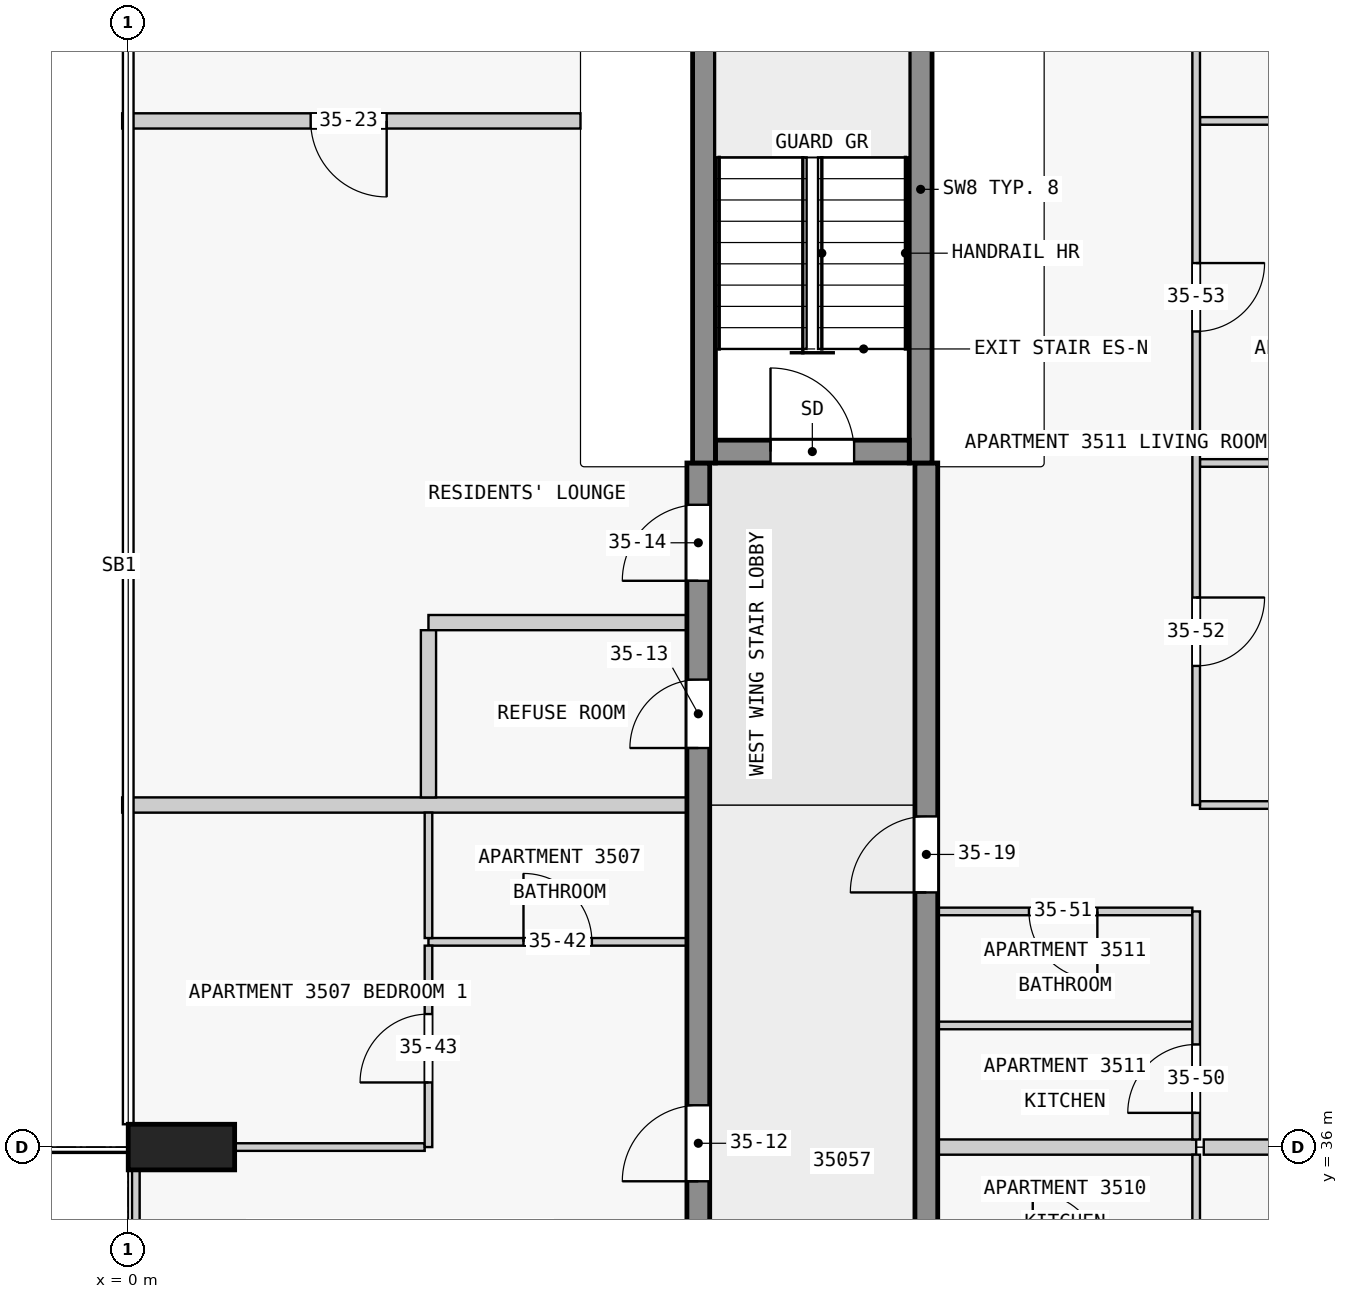
"""IFC4 building model, lengths in metres.
Left out: names, types, materials, properties, quantities, classifications, styles, units other than length and angle.
Written with IfcOpenShell. Run it as: python <this file> out.ifc"""

import sys

from ifc_helpers import new_model, si_unit, direction, frame, frame_2d, origin, origin_2d, place, context, subcontext, project, spatial, rectangle, extrude, element, fill, save


model = new_model("IFC4")
c1 = context("Model", 3, precision=1e-05, world=origin(), true_north=direction((0.0, 1.0)))
c2 = subcontext(c1, "Body", "Model", "MODEL_VIEW")
j1 = project(units=[si_unit("LENGTHUNIT", "METRE"), si_unit("PLANEANGLEUNIT", "RADIAN")], contexts=[c1])
p1 = place(None, origin())
s1 = spatial("IfcSite", under=j1, at=p1, CompositionType="ELEMENT")
p2 = place(p1, origin())
s2 = spatial("IfcBuilding", under=s1, at=p2, CompositionType="ELEMENT")
p3 = place(p2, frame((0.0, 0.0, 139.4)))
s3 = spatial("IfcBuildingStorey", under=s2, at=p3, CompositionType="ELEMENT", Elevation=139.4)
p4 = place(p3, frame((0.7, 36.0, 0.0), z_axis=(0.0, 0.0, 1.0), x_axis=(0.0, 1.0, 0.0)))
e1 = element("IfcColumn", 1, at=p4, inside=s3, PredefinedType="COLUMN", context=c2, shape_type="SweptSolid", body=[
    extrude(rectangle(XDim=0.6, YDim=1.4, at=origin_2d()), origin(), (0.0, 0.0, 1.0), 3.5),
])
p5 = place(p3, frame((7.725, 45.15, 0.0), z_axis=(0.0, 0.0, 1.0), x_axis=(1.0, 0.0, 0.0)))
e2 = element("IfcWall", 2, at=p5, inside=s3, PredefinedType="SHEAR", context=c2, shape_type="SweptSolid", body=[
    extrude(rectangle(XDim=2.55, YDim=0.3, at=frame_2d((1.275, 0.0))), origin(), (0.0, 0.0, 1.0), 3.5),
])
p6 = place(p5, frame((0.725, 0.0, 0.0)))
e3 = element("IfcOpeningElement", 3, at=p6, cuts=e2, PredefinedType="OPENING", context=c2, shape_type="SweptSolid", body=[
    extrude(rectangle(XDim=1.1, YDim=2.1, at=frame_2d((0.55, 1.05))), frame((0.0, 0.16, 0.0), z_axis=(0.0, -1.0, 0.0), x_axis=(1.0, 0.0, 0.0)), (0.0, 0.0, 1.0), 0.32),
])
for number, where, z_axis, x_axis in (
    (4, (7.575, 45.0, 0.0), (0.0, 0.0, 1.0), (0.0, 1.0, 0.0)),
    (5, (10.425, 45.0, 0.0), (0.0, 0.0, 1.0), (0.0, 1.0, 0.0)),
):
    element("IfcWall", number, at=place(p3, frame(where, z_axis=z_axis, x_axis=x_axis)), inside=s3, PredefinedType="SHEAR", context=c2, shape_type="SweptSolid", body=[
        extrude(rectangle(XDim=7.2, YDim=0.3, at=frame_2d((3.6, 0.0))), origin(), (0.0, 0.0, 1.0), 3.5),
    ])
p7 = place(p3, frame((7.5, 18.0, 0.0), z_axis=(0.0, 0.0, 1.0), x_axis=(0.0, 1.0, 0.0)))
e6 = element("IfcWall", 6, at=p7, inside=s3, PredefinedType="SHEAR", context=c2, shape_type="SweptSolid", body=[
    extrude(rectangle(XDim=27.0, YDim=0.3, at=frame_2d((13.5, 0.0))), origin(), (0.0, 0.0, 1.0), 3.25),
])
p8 = place(p7, frame((4.05, 0.0, 0.0)))
e7 = element("IfcOpeningElement", 7, at=p8, cuts=e6, PredefinedType="OPENING", context=c2, shape_type="SweptSolid", body=[
    extrude(rectangle(XDim=1.0, YDim=2.1, at=frame_2d((0.5, 1.05))), frame((0.0, 0.16, 0.0), z_axis=(0.0, -1.0, 0.0), x_axis=(1.0, 0.0, 0.0)), (0.0, 0.0, 1.0), 0.32),
])
p9 = place(p7, frame((10.75, 0.0, 0.0)))
e8 = element("IfcOpeningElement", 8, at=p9, cuts=e6, PredefinedType="OPENING", context=c2, shape_type="SweptSolid", body=[
    extrude(rectangle(XDim=1.0, YDim=2.1, at=frame_2d((0.5, 1.05))), frame((0.0, 0.16, 0.0), z_axis=(0.0, -1.0, 0.0), x_axis=(1.0, 0.0, 0.0)), (0.0, 0.0, 1.0), 0.32),
])
p10 = place(p7, frame((17.55, 0.0, 0.0)))
e9 = element("IfcOpeningElement", 9, at=p10, cuts=e6, PredefinedType="OPENING", context=c2, shape_type="SweptSolid", body=[
    extrude(rectangle(XDim=1.0, YDim=2.1, at=frame_2d((0.5, 1.05))), frame((0.0, 0.16, 0.0), z_axis=(0.0, -1.0, 0.0), x_axis=(1.0, 0.0, 0.0)), (0.0, 0.0, 1.0), 0.32),
])
p11 = place(p7, frame((23.25, 0.0, 0.0)))
e10 = element("IfcOpeningElement", 10, at=p11, cuts=e6, PredefinedType="OPENING", context=c2, shape_type="SweptSolid", body=[
    extrude(rectangle(XDim=0.9, YDim=2.1, at=frame_2d((0.45, 1.05))), frame((0.0, 0.16, 0.0), z_axis=(0.0, -1.0, 0.0), x_axis=(1.0, 0.0, 0.0)), (0.0, 0.0, 1.0), 0.32),
])
p12 = place(p7, frame((25.45, 0.0, 0.0)))
e11 = element("IfcOpeningElement", 11, at=p12, cuts=e6, PredefinedType="OPENING", context=c2, shape_type="SweptSolid", body=[
    extrude(rectangle(XDim=1.0, YDim=2.1, at=frame_2d((0.5, 1.05))), frame((0.0, 0.16, 0.0), z_axis=(0.0, -1.0, 0.0), x_axis=(1.0, 0.0, 0.0)), (0.0, 0.0, 1.0), 0.32),
])
p13 = place(p3, frame((10.5, 18.0, 0.0), z_axis=(0.0, 0.0, 1.0), x_axis=(0.0, 1.0, 0.0)))
e12 = element("IfcWall", 12, at=p13, inside=s3, PredefinedType="SHEAR", context=c2, shape_type="SweptSolid", body=[
    extrude(rectangle(XDim=27.0, YDim=0.3, at=frame_2d((13.5, 0.0))), origin(), (0.0, 0.0, 1.0), 3.25),
])
p14 = place(p13, frame((1.75, 0.0, 0.0)))
e13 = element("IfcOpeningElement", 13, at=p14, cuts=e12, PredefinedType="OPENING", context=c2, shape_type="SweptSolid", body=[
    extrude(rectangle(XDim=1.0, YDim=2.1, at=frame_2d((0.5, 1.05))), frame((0.0, 0.16, 0.0), z_axis=(0.0, -1.0, 0.0), x_axis=(1.0, 0.0, 0.0)), (0.0, 0.0, 1.0), 0.32),
])
p15 = place(p13, frame((6.25, 0.0, 0.0)))
e14 = element("IfcOpeningElement", 14, at=p15, cuts=e12, PredefinedType="OPENING", context=c2, shape_type="SweptSolid", body=[
    extrude(rectangle(XDim=1.0, YDim=2.1, at=frame_2d((0.5, 1.05))), frame((0.0, 0.16, 0.0), z_axis=(0.0, -1.0, 0.0), x_axis=(1.0, 0.0, 0.0)), (0.0, 0.0, 1.0), 0.32),
])
p16 = place(p13, frame((10.35, 0.0, 0.0)))
e15 = element("IfcOpeningElement", 15, at=p16, cuts=e12, PredefinedType="OPENING", context=c2, shape_type="SweptSolid", body=[
    extrude(rectangle(XDim=1.8, YDim=2.1, at=frame_2d((0.9, 1.05))), frame((0.0, 0.16, 0.0), z_axis=(0.0, -1.0, 0.0), x_axis=(1.0, 0.0, 0.0)), (0.0, 0.0, 1.0), 0.32),
])
p17 = place(p13, frame((15.25, 0.0, 0.0)))
e16 = element("IfcOpeningElement", 16, at=p17, cuts=e12, PredefinedType="OPENING", context=c2, shape_type="SweptSolid", body=[
    extrude(rectangle(XDim=1.0, YDim=2.1, at=frame_2d((0.5, 1.05))), frame((0.0, 0.16, 0.0), z_axis=(0.0, -1.0, 0.0), x_axis=(1.0, 0.0, 0.0)), (0.0, 0.0, 1.0), 0.32),
])
p18 = place(p13, frame((21.35, 0.0, 0.0)))
e17 = element("IfcOpeningElement", 17, at=p18, cuts=e12, PredefinedType="OPENING", context=c2, shape_type="SweptSolid", body=[
    extrude(rectangle(XDim=1.0, YDim=2.1, at=frame_2d((0.5, 1.05))), frame((0.0, 0.16, 0.0), z_axis=(0.0, -1.0, 0.0), x_axis=(1.0, 0.0, 0.0)), (0.0, 0.0, 1.0), 0.32),
])
p19 = place(p3, frame((0.1, 31.5, 0.0), z_axis=(0.0, 0.0, 1.0), x_axis=(0.0, 1.0, 0.0)))
e18 = element("IfcWall", 18, at=p19, inside=s3, PredefinedType="STANDARD", context=c2, shape_type="SweptSolid", body=[
    extrude(rectangle(XDim=4.5, YDim=0.1, at=frame_2d((2.25, 0.0))), origin(), (0.0, 0.0, 1.0), 3.25),
])
p20 = place(p19, frame((1.05, 0.0, 0.0)))
e19 = element("IfcOpeningElement", 19, at=p20, cuts=e18, PredefinedType="OPENING", context=c2, shape_type="SweptSolid", body=[
    extrude(rectangle(XDim=2.4, YDim=2.4, at=frame_2d((1.2, 1.2))), frame((0.0, 0.06, 0.0), z_axis=(0.0, -1.0, 0.0), x_axis=(1.0, 0.0, 0.0)), (0.0, 0.0, 1.0), 0.12),
])
p21 = place(p3, frame((1.4, 36.0, 0.0), z_axis=(0.0, 0.0, 1.0), x_axis=(1.0, 0.0, 0.0)))
e20 = element("IfcWall", 20, at=p21, inside=s3, PredefinedType="PARTITIONING", context=c2, shape_type="SweptSolid", body=[
    extrude(rectangle(XDim=2.5, YDim=0.1, at=frame_2d((1.25, 0.0))), origin(), (0.0, 0.0, 1.0), 3.25),
])
p22 = place(p3, frame((14.05, 36.0, 0.0), z_axis=(0.0, 0.0, 1.0), x_axis=(-1.0, 0.0, 0.0)))
e21 = element("IfcWall", 21, at=p22, inside=s3, PredefinedType="PARTITIONING", context=c2, shape_type="SweptSolid", body=[
    extrude(rectangle(XDim=3.4, YDim=0.2, at=frame_2d((1.7, 0.0))), origin(), (0.0, 0.0, 1.0), 3.25),
])
p23 = place(p3, frame((14.15, 36.0, 0.0), z_axis=(0.0, 0.0, 1.0), x_axis=(1.0, 0.0, 0.0)))
e22 = element("IfcWall", 22, at=p23, inside=s3, PredefinedType="PARTITIONING", context=c2, shape_type="SweptSolid", body=[
    extrude(rectangle(XDim=2.45, YDim=0.2, at=frame_2d((1.225, 0.0))), origin(), (0.0, 0.0, 1.0), 3.25),
])
p24 = place(p3, frame((14.0, 37.6, 0.0), z_axis=(0.0, 0.0, 1.0), x_axis=(-1.0, 0.0, 0.0)))
e23 = element("IfcWall", 23, at=p24, inside=s3, PredefinedType="PARTITIONING", context=c2, shape_type="SweptSolid", body=[
    extrude(rectangle(XDim=3.35, YDim=0.1, at=frame_2d((1.675, 0.0))), origin(), (0.0, 0.0, 1.0), 3.25),
])
p25 = place(p3, frame((3.95, 38.7, 0.0), z_axis=(0.0, 0.0, 1.0), x_axis=(1.0, 0.0, 0.0)))
e24 = element("IfcWall", 24, at=p25, inside=s3, PredefinedType="PARTITIONING", context=c2, shape_type="SweptSolid", body=[
    extrude(rectangle(XDim=3.4, YDim=0.1, at=frame_2d((1.7, 0.0))), origin(), (0.0, 0.0, 1.0), 3.25),
])
p26 = place(p25, frame((1.25, 0.0, 0.0)))
e25 = element("IfcOpeningElement", 25, at=p26, cuts=e24, PredefinedType="OPENING", context=c2, shape_type="SweptSolid", body=[
    extrude(rectangle(XDim=0.9, YDim=2.1, at=frame_2d((0.45, 1.05))), frame((0.0, 0.06, 0.0), z_axis=(0.0, -1.0, 0.0), x_axis=(1.0, 0.0, 0.0)), (0.0, 0.0, 1.0), 0.12),
])
p27 = place(p3, frame((14.0, 39.1, 0.0), z_axis=(0.0, 0.0, 1.0), x_axis=(-1.0, 0.0, 0.0)))
e26 = element("IfcWall", 26, at=p27, inside=s3, PredefinedType="PARTITIONING", context=c2, shape_type="SweptSolid", body=[
    extrude(rectangle(XDim=3.35, YDim=0.1, at=frame_2d((1.675, 0.0))), origin(), (0.0, 0.0, 1.0), 3.25),
])
p28 = place(p27, frame((1.25, 0.0, 0.0)))
e27 = element("IfcOpeningElement", 27, at=p28, cuts=e26, PredefinedType="OPENING", context=c2, shape_type="SweptSolid", body=[
    extrude(rectangle(XDim=0.9, YDim=2.1, at=frame_2d((0.45, 1.05))), frame((0.0, 0.06, 0.0), z_axis=(0.0, -1.0, 0.0), x_axis=(1.0, 0.0, 0.0)), (0.0, 0.0, 1.0), 0.12),
])
p29 = place(p3, frame((14.1, 40.5, 0.0), z_axis=(0.0, 0.0, 1.0), x_axis=(1.0, 0.0, 0.0)))
e28 = element("IfcWall", 28, at=p29, inside=s3, PredefinedType="PARTITIONING", context=c2, shape_type="SweptSolid", body=[
    extrude(rectangle(XDim=3.75, YDim=0.1, at=frame_2d((1.875, 0.0))), origin(), (0.0, 0.0, 1.0), 3.25),
])
p30 = place(p3, frame((7.35, 40.5, 0.0), z_axis=(0.0, 0.0, 1.0), x_axis=(-1.0, 0.0, 0.0)))
e29 = element("IfcWall", 29, at=p30, inside=s3, PredefinedType="PARTITIONING", context=c2, shape_type="SweptSolid", body=[
    extrude(rectangle(XDim=7.43, YDim=0.2, at=frame_2d((3.715, 0.0))), origin(), (0.0, 0.0, 1.0), 3.25),
])
p31 = place(p3, frame((7.35, 42.9, 0.0), z_axis=(0.0, 0.0, 1.0), x_axis=(-1.0, 0.0, 0.0)))
e30 = element("IfcWall", 30, at=p31, inside=s3, PredefinedType="PARTITIONING", context=c2, shape_type="SweptSolid", body=[
    extrude(rectangle(XDim=3.4, YDim=0.2, at=frame_2d((1.7, 0.0))), origin(), (0.0, 0.0, 1.0), 3.25),
])
p32 = place(p3, frame((17.85, 45.0, 0.0), z_axis=(0.0, 0.0, 1.0), x_axis=(-1.0, 0.0, 0.0)))
e31 = element("IfcWall", 31, at=p32, inside=s3, PredefinedType="PARTITIONING", context=c2, shape_type="SweptSolid", body=[
    extrude(rectangle(XDim=3.75, YDim=0.1, at=frame_2d((1.875, 0.0))), origin(), (0.0, 0.0, 1.0), 3.25),
])
p33 = place(p3, frame((18.08, 49.5, 0.0), z_axis=(0.0, 0.0, 1.0), x_axis=(-1.0, 0.0, 0.0)))
e32 = element("IfcWall", 32, at=p33, inside=s3, PredefinedType="PARTITIONING", context=c2, shape_type="SweptSolid", body=[
    extrude(rectangle(XDim=3.98, YDim=0.1, at=frame_2d((1.99, 0.0))), origin(), (0.0, 0.0, 1.0), 3.25),
])
p34 = place(p3, frame((5.95, 49.5, 0.0), z_axis=(0.0, 0.0, 1.0), x_axis=(-1.0, 0.0, 0.0)))
e33 = element("IfcWall", 33, at=p34, inside=s3, PredefinedType="PARTITIONING", context=c2, shape_type="SweptSolid", body=[
    extrude(rectangle(XDim=6.03, YDim=0.2, at=frame_2d((3.015, 0.0))), origin(), (0.0, 0.0, 1.0), 3.25),
])
p35 = place(p34, frame((2.55, 0.0, 0.0)))
e34 = element("IfcOpeningElement", 34, at=p35, cuts=e33, PredefinedType="OPENING", context=c2, shape_type="SweptSolid", body=[
    extrude(rectangle(XDim=1.0, YDim=2.1, at=frame_2d((0.5, 1.05))), frame((0.0, 0.11, 0.0), z_axis=(0.0, -1.0, 0.0), x_axis=(1.0, 0.0, 0.0)), (0.0, 0.0, 1.0), 0.22),
])
p36 = place(p3, frame((3.95, 40.4, 0.0), z_axis=(0.0, 0.0, 1.0), x_axis=(0.0, -1.0, 0.0)))
e35 = element("IfcWall", 35, at=p36, inside=s3, PredefinedType="PARTITIONING", context=c2, shape_type="SweptSolid", body=[
    extrude(rectangle(XDim=1.65, YDim=0.1, at=frame_2d((0.825, 0.0))), origin(), (0.0, 0.0, 1.0), 3.25),
])
p37 = place(p3, frame((3.95, 36.0, 0.0), z_axis=(0.0, 0.0, 1.0), x_axis=(0.0, 1.0, 0.0)))
e36 = element("IfcWall", 36, at=p37, inside=s3, PredefinedType="PARTITIONING", context=c2, shape_type="SweptSolid", body=[
    extrude(rectangle(XDim=2.65, YDim=0.1, at=frame_2d((1.325, 0.0))), origin(), (0.0, 0.0, 1.0), 3.25),
])
p38 = place(p37, frame((0.85, 0.0, 0.0)))
e37 = element("IfcOpeningElement", 37, at=p38, cuts=e36, PredefinedType="OPENING", context=c2, shape_type="SweptSolid", body=[
    extrude(rectangle(XDim=0.9, YDim=2.1, at=frame_2d((0.45, 1.05))), frame((0.0, 0.06, 0.0), z_axis=(0.0, -1.0, 0.0), x_axis=(1.0, 0.0, 0.0)), (0.0, 0.0, 1.0), 0.12),
])
p39 = place(p3, frame((3.95, 42.8, 0.0), z_axis=(0.0, 0.0, 1.0), x_axis=(0.0, -1.0, 0.0)))
e38 = element("IfcWall", 38, at=p39, inside=s3, PredefinedType="PARTITIONING", context=c2, shape_type="SweptSolid", body=[
    extrude(rectangle(XDim=2.2, YDim=0.2, at=frame_2d((1.1, 0.0))), origin(), (0.0, 0.0, 1.0), 3.25),
])
p40 = place(p3, frame((14.05, 54.08, 0.0), z_axis=(0.0, 0.0, 1.0), x_axis=(0.0, -1.0, 0.0)))
e39 = element("IfcWall", 39, at=p40, inside=s3, PredefinedType="PARTITIONING", context=c2, shape_type="SweptSolid", body=[
    extrude(rectangle(XDim=13.58, YDim=0.1, at=frame_2d((6.79, 0.0))), origin(), (0.0, 0.0, 1.0), 3.25),
])
p41 = place(p40, frame((10.85, 0.0, 0.0)))
e40 = element("IfcOpeningElement", 40, at=p41, cuts=e39, PredefinedType="OPENING", context=c2, shape_type="SweptSolid", body=[
    extrude(rectangle(XDim=0.9, YDim=2.1, at=frame_2d((0.45, 1.05))), frame((0.0, 0.06, 0.0), z_axis=(0.0, -1.0, 0.0), x_axis=(1.0, 0.0, 0.0)), (0.0, 0.0, 1.0), 0.12),
])
p42 = place(p40, frame((6.45, 0.0, 0.0)))
e41 = element("IfcOpeningElement", 41, at=p42, cuts=e39, PredefinedType="OPENING", context=c2, shape_type="SweptSolid", body=[
    extrude(rectangle(XDim=0.9, YDim=2.1, at=frame_2d((0.45, 1.05))), frame((0.0, 0.06, 0.0), z_axis=(0.0, -1.0, 0.0), x_axis=(1.0, 0.0, 0.0)), (0.0, 0.0, 1.0), 0.12),
])
p43 = place(p40, frame((1.95, 0.0, 0.0)))
e42 = element("IfcOpeningElement", 42, at=p43, cuts=e39, PredefinedType="OPENING", context=c2, shape_type="SweptSolid", body=[
    extrude(rectangle(XDim=0.9, YDim=2.1, at=frame_2d((0.45, 1.05))), frame((0.0, 0.06, 0.0), z_axis=(0.0, -1.0, 0.0), x_axis=(1.0, 0.0, 0.0)), (0.0, 0.0, 1.0), 0.12),
])
p44 = place(p3, frame((14.05, 34.5, 0.0), z_axis=(0.0, 0.0, 1.0), x_axis=(0.0, 1.0, 0.0)))
e43 = element("IfcWall", 43, at=p44, inside=s3, PredefinedType="PARTITIONING", context=c2, shape_type="SweptSolid", body=[
    extrude(rectangle(XDim=1.4, YDim=0.1, at=frame_2d((0.7, 0.0))), origin(), (0.0, 0.0, 1.0), 3.25),
])
p45 = place(p3, frame((14.05, 36.1, 0.0), z_axis=(0.0, 0.0, 1.0), x_axis=(0.0, 1.0, 0.0)))
e44 = element("IfcWall", 44, at=p45, inside=s3, PredefinedType="PARTITIONING", context=c2, shape_type="SweptSolid", body=[
    extrude(rectangle(XDim=3.0, YDim=0.1, at=frame_2d((1.5, 0.0))), origin(), (0.0, 0.0, 1.0), 3.25),
])
p46 = place(p45, frame((0.35, 0.0, 0.0)))
e45 = element("IfcOpeningElement", 45, at=p46, cuts=e44, PredefinedType="OPENING", context=c2, shape_type="SweptSolid", body=[
    extrude(rectangle(XDim=0.9, YDim=2.1, at=frame_2d((0.45, 1.05))), frame((0.0, 0.06, 0.0), z_axis=(0.0, -1.0, 0.0), x_axis=(1.0, 0.0, 0.0)), (0.0, 0.0, 1.0), 0.12),
])
p47 = place(p6, origin())
e46 = element("IfcDoor", 46, at=p47, inside=s3, OperationType="SINGLE_SWING_LEFT", PredefinedType="DOOR", context=c2, shape_type="SweptSolid", body=[
    extrude(rectangle(XDim=1.1, YDim=2.1, at=frame_2d((0.55, 1.05))), frame((0.0, 0.025, 0.0), z_axis=(0.0, -1.0, 0.0), x_axis=(1.0, 0.0, 0.0)), (0.0, 0.0, 1.0), 0.05),
])
fill(e3, e46)
p48 = place(p10, origin())
e47 = element("IfcDoor", 47, at=p48, inside=s3, OperationType="SINGLE_SWING_RIGHT", PredefinedType="DOOR", context=c2, shape_type="SweptSolid", body=[
    extrude(rectangle(XDim=1.0, YDim=2.1, at=frame_2d((0.5, 1.05))), frame((0.0, 0.025, 0.0), z_axis=(0.0, -1.0, 0.0), x_axis=(1.0, 0.0, 0.0)), (0.0, 0.0, 1.0), 0.05),
])
fill(e9, e47)
p49 = place(p11, origin())
e48 = element("IfcDoor", 48, at=p49, inside=s3, OperationType="SINGLE_SWING_RIGHT", PredefinedType="DOOR", context=c2, shape_type="SweptSolid", body=[
    extrude(rectangle(XDim=0.9, YDim=2.1, at=frame_2d((0.45, 1.05))), frame((0.0, 0.025, 0.0), z_axis=(0.0, -1.0, 0.0), x_axis=(1.0, 0.0, 0.0)), (0.0, 0.0, 1.0), 0.05),
])
fill(e10, e48)
p50 = place(p12, origin())
e49 = element("IfcDoor", 49, at=p50, inside=s3, OperationType="SINGLE_SWING_RIGHT", PredefinedType="DOOR", context=c2, shape_type="SweptSolid", body=[
    extrude(rectangle(XDim=1.0, YDim=2.1, at=frame_2d((0.5, 1.05))), frame((0.0, 0.025, 0.0), z_axis=(0.0, -1.0, 0.0), x_axis=(1.0, 0.0, 0.0)), (0.0, 0.0, 1.0), 0.05),
])
fill(e11, e49)
p51 = place(p18, origin())
e50 = element("IfcDoor", 50, at=p51, inside=s3, OperationType="SINGLE_SWING_RIGHT", PredefinedType="DOOR", context=c2, shape_type="SweptSolid", body=[
    extrude(rectangle(XDim=1.0, YDim=2.1, at=frame_2d((0.5, 1.05))), frame((0.0, 0.025, 0.0), z_axis=(0.0, -1.0, 0.0), x_axis=(1.0, 0.0, 0.0)), (0.0, 0.0, 1.0), 0.05),
])
fill(e17, e50)
p52 = place(p35, origin())
e51 = element("IfcDoor", 51, at=p52, inside=s3, OperationType="SINGLE_SWING_RIGHT", PredefinedType="DOOR", context=c2, shape_type="SweptSolid", body=[
    extrude(rectangle(XDim=1.0, YDim=2.1, at=frame_2d((0.5, 1.05))), frame((0.0, 0.025, 0.0), z_axis=(0.0, -1.0, 0.0), x_axis=(1.0, 0.0, 0.0)), (0.0, 0.0, 1.0), 0.05),
])
fill(e34, e51)
p53 = place(p26, origin())
e52 = element("IfcDoor", 52, at=p53, inside=s3, OperationType="SINGLE_SWING_RIGHT", PredefinedType="DOOR", context=c2, shape_type="SweptSolid", body=[
    extrude(rectangle(XDim=0.9, YDim=2.1, at=frame_2d((0.45, 1.05))), frame((0.0, 0.025, 0.0), z_axis=(0.0, -1.0, 0.0), x_axis=(1.0, 0.0, 0.0)), (0.0, 0.0, 1.0), 0.05),
])
fill(e25, e52)
p54 = place(p38, origin())
e53 = element("IfcDoor", 53, at=p54, inside=s3, OperationType="SINGLE_SWING_LEFT", PredefinedType="DOOR", context=c2, shape_type="SweptSolid", body=[
    extrude(rectangle(XDim=0.9, YDim=2.1, at=frame_2d((0.45, 1.05))), frame((0.0, 0.025, 0.0), z_axis=(0.0, -1.0, 0.0), x_axis=(1.0, 0.0, 0.0)), (0.0, 0.0, 1.0), 0.05),
])
fill(e37, e53)
p55 = place(p46, origin())
e54 = element("IfcDoor", 54, at=p55, inside=s3, OperationType="SINGLE_SWING_LEFT", PredefinedType="DOOR", context=c2, shape_type="SweptSolid", body=[
    extrude(rectangle(XDim=0.9, YDim=2.1, at=frame_2d((0.45, 1.05))), frame((0.0, 0.025, 0.0), z_axis=(0.0, -1.0, 0.0), x_axis=(1.0, 0.0, 0.0)), (0.0, 0.0, 1.0), 0.05),
])
fill(e45, e54)
p56 = place(p28, origin())
e55 = element("IfcDoor", 55, at=p56, inside=s3, OperationType="SINGLE_SWING_RIGHT", PredefinedType="DOOR", context=c2, shape_type="SweptSolid", body=[
    extrude(rectangle(XDim=0.9, YDim=2.1, at=frame_2d((0.45, 1.05))), frame((0.0, 0.025, 0.0), z_axis=(0.0, -1.0, 0.0), x_axis=(1.0, 0.0, 0.0)), (0.0, 0.0, 1.0), 0.05),
])
fill(e27, e55)
p57 = place(p41, origin())
e56 = element("IfcDoor", 56, at=p57, inside=s3, OperationType="SINGLE_SWING_RIGHT", PredefinedType="DOOR", context=c2, shape_type="SweptSolid", body=[
    extrude(rectangle(XDim=0.9, YDim=2.1, at=frame_2d((0.45, 1.05))), frame((0.0, 0.025, 0.0), z_axis=(0.0, -1.0, 0.0), x_axis=(1.0, 0.0, 0.0)), (0.0, 0.0, 1.0), 0.05),
])
fill(e40, e56)
p58 = place(p42, origin())
e57 = element("IfcDoor", 57, at=p58, inside=s3, OperationType="SINGLE_SWING_RIGHT", PredefinedType="DOOR", context=c2, shape_type="SweptSolid", body=[
    extrude(rectangle(XDim=0.9, YDim=2.1, at=frame_2d((0.45, 1.05))), frame((0.0, 0.025, 0.0), z_axis=(0.0, -1.0, 0.0), x_axis=(1.0, 0.0, 0.0)), (0.0, 0.0, 1.0), 0.05),
])
fill(e41, e57)
save(model, sys.argv[1])
